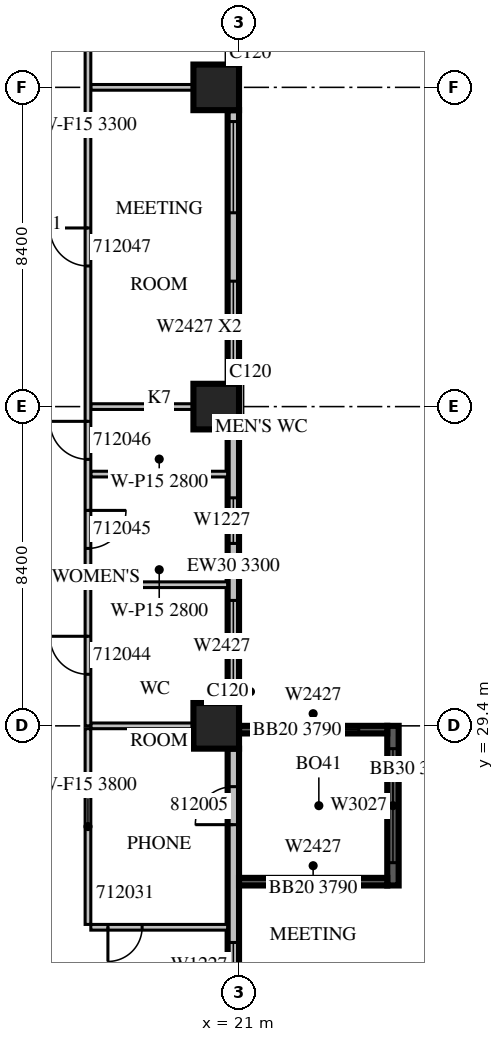
"""IFC4 building model, lengths in metres.
Left out: names, types, materials, properties, quantities, classifications, styles, units other than length and angle.
Written with IfcOpenShell. Run it as: python <this file> out.ifc"""

import sys

from ifc_helpers import new_model, si_unit, direction, frame, frame_2d, origin, origin_2d, place, context, subcontext, project, spatial, rectangle, extrude, source, transform, mapped, element, fill, save


model = new_model("IFC4")
c1 = context("Model", 3, precision=1e-05, world=origin(), true_north=direction((0.0, 1.0)))
c2 = subcontext(c1, "Body", "Model", "MODEL_VIEW")
j1 = project(units=[si_unit("LENGTHUNIT", "METRE"), si_unit("PLANEANGLEUNIT", "RADIAN")], contexts=[c1])
p1 = place(None, origin())
s1 = spatial("IfcSite", under=j1, at=p1, CompositionType="ELEMENT")
p2 = place(p1, origin())
s2 = spatial("IfcBuilding", under=s1, at=p2, CompositionType="ELEMENT")
p3 = place(p2, frame((0.0, 0.0, 61.5)))
s3 = spatial("IfcBuildingStorey", under=s2, at=p3, CompositionType="ELEMENT", Elevation=61.5)
m1 = source(origin(), c2, "Body", "SweptSolid", [
    extrude(rectangle(XDim=1.2, YDim=1.2, at=origin_2d()), origin(), (0.0, 0.0, 1.0), 4.2),
])
for number, where, z_axis, x_axis in (
    (1, (20.4, 29.4, 0.0), (0.0, 0.0, 1.0), (1.0, 0.0, 0.0)),
    (2, (20.4, 37.8, 0.0), (0.0, 0.0, 1.0), (1.0, 0.0, 0.0)),
    (3, (20.4, 46.2, 0.0), (0.0, 0.0, 1.0), (1.0, 0.0, 0.0)),
):
    element("IfcColumn", number, at=place(p3, frame(where, z_axis=z_axis, x_axis=x_axis)), inside=s3, PredefinedType="COLUMN", context=c2, shape_type="MappedRepresentation", body=[
        mapped(m1, transform((0.0, 0.0, 0.0), scale=1.0)),
    ])
m2 = source(origin(), c2, "Body", "SweptSolid", [
    extrude(rectangle(XDim=6.6, YDim=0.3, at=frame_2d((3.3, 0.0))), origin(), (0.0, 0.0, 1.0), 3.8),
])
p4 = place(p3, frame((20.85, 22.2, 0.0), z_axis=(0.0, 0.0, 1.0), x_axis=(0.0, 1.0, 0.0)))
e4 = element("IfcWall", 4, at=p4, inside=s3, PredefinedType="STANDARD", context=c2, shape_type="MappedRepresentation", body=[
    mapped(m2, transform((0.0, 0.0, 0.0), scale=1.0)),
])
m3 = source(origin(), c2, "Body", "SweptSolid", [
    extrude(rectangle(XDim=1.2, YDim=2.7, at=frame_2d((0.6, 1.35))), frame((0.0, 0.16, 0.0), z_axis=(0.0, -1.0, 0.0), x_axis=(1.0, 0.0, 0.0)), (0.0, 0.0, 1.0), 0.32),
])
p5 = place(p4, frame((0.3, 0.0, 0.6)))
e5 = element("IfcOpeningElement", 5, at=p5, cuts=e4, PredefinedType="OPENING", context=c2, shape_type="MappedRepresentation", body=[
    mapped(m3, transform((0.0, 0.0, 0.0), scale=1.0)),
])
m4 = source(origin(), c2, "Body", "SweptSolid", [
    extrude(rectangle(XDim=1.0, YDim=2.1, at=frame_2d((0.5, 1.05))), frame((0.0, 0.16, 0.0), z_axis=(0.0, -1.0, 0.0), x_axis=(1.0, 0.0, 0.0)), (0.0, 0.0, 1.0), 0.32),
])
p6 = place(p4, frame((4.6, 0.0, 0.0)))
e6 = element("IfcOpeningElement", 6, at=p6, cuts=e4, PredefinedType="OPENING", context=c2, shape_type="MappedRepresentation", body=[
    mapped(m4, transform((0.0, 0.0, 0.0), scale=1.0)),
])
m5 = source(origin(), c2, "Body", "SweptSolid", [
    extrude(rectangle(XDim=7.2, YDim=0.3, at=frame_2d((3.6, 0.0))), origin(), (0.0, 0.0, 1.0), 3.3),
])
p7 = place(p3, frame((20.85, 30.0, 0.0), z_axis=(0.0, 0.0, 1.0), x_axis=(0.0, 1.0, 0.0)))
e7 = element("IfcWall", 7, at=p7, inside=s3, PredefinedType="STANDARD", context=c2, shape_type="MappedRepresentation", body=[
    mapped(m5, transform((0.0, 0.0, 0.0), scale=1.0)),
])
m6 = source(origin(), c2, "Body", "SweptSolid", [
    extrude(rectangle(XDim=2.4, YDim=2.7, at=frame_2d((1.2, 1.35))), frame((0.0, 0.16, 0.0), z_axis=(0.0, -1.0, 0.0), x_axis=(1.0, 0.0, 0.0)), (0.0, 0.0, 1.0), 0.32),
])
p8 = place(p7, frame((0.3, 0.0, 0.6)))
e8 = element("IfcOpeningElement", 8, at=p8, cuts=e7, PredefinedType="OPENING", context=c2, shape_type="MappedRepresentation", body=[
    mapped(m6, transform((0.0, 0.0, 0.0), scale=1.0)),
])
p9 = place(p7, frame((4.199, 0.0, 0.6)))
e9 = element("IfcOpeningElement", 9, at=p9, cuts=e7, PredefinedType="OPENING", context=c2, shape_type="MappedRepresentation", body=[
    mapped(m3, transform((0.0, 0.0, 0.0), scale=1.0)),
])
m7 = source(origin(), c2, "Body", "SweptSolid", [
    extrude(rectangle(XDim=7.2, YDim=0.3, at=frame_2d((3.6, 0.0))), origin(), (0.0, 0.0, 1.0), 3.8),
])
p10 = place(p3, frame((20.85, 38.4, 0.0), z_axis=(0.0, 0.0, 1.0), x_axis=(0.0, 1.0, 0.0)))
e10 = element("IfcWall", 10, at=p10, inside=s3, PredefinedType="STANDARD", context=c2, shape_type="MappedRepresentation", body=[
    mapped(m7, transform((0.0, 0.0, 0.0), scale=1.0)),
])
p11 = place(p10, frame((0.3, 0.0, 0.6)))
e11 = element("IfcOpeningElement", 11, at=p11, cuts=e10, PredefinedType="OPENING", context=c2, shape_type="MappedRepresentation", body=[
    mapped(m6, transform((0.0, 0.0, 0.0), scale=1.0)),
])
p12 = place(p10, frame((4.5, 0.0, 0.6)))
e12 = element("IfcOpeningElement", 12, at=p12, cuts=e10, PredefinedType="OPENING", context=c2, shape_type="MappedRepresentation", body=[
    mapped(m6, transform((0.0, 0.0, 0.0), scale=1.0)),
])
m8 = source(origin(), c2, "Body", "SweptSolid", [
    extrude(rectangle(XDim=4.68, YDim=0.3, at=frame_2d((2.34, 0.0))), origin(), (0.0, 0.0, 1.0), 3.8),
])
p13 = place(p3, frame((20.85, 46.8, 0.0), z_axis=(0.0, 0.0, 1.0), x_axis=(0.0, 1.0, 0.0)))
e13 = element("IfcWall", 13, at=p13, inside=s3, PredefinedType="STANDARD", context=c2, shape_type="MappedRepresentation", body=[
    mapped(m8, transform((0.0, 0.0, 0.0), scale=1.0)),
])
m9 = source(origin(), c2, "Body", "SweptSolid", [
    extrude(rectangle(XDim=3.6, YDim=2.7, at=frame_2d((1.8, 1.35))), frame((0.0, 0.16, 0.0), z_axis=(0.0, -1.0, 0.0), x_axis=(1.0, 0.0, 0.0)), (0.0, 0.0, 1.0), 0.32),
])
p14 = place(p13, frame((0.54, 0.0, 0.6)))
e14 = element("IfcOpeningElement", 14, at=p14, cuts=e13, PredefinedType="OPENING", context=c2, shape_type="MappedRepresentation", body=[
    mapped(m9, transform((0.0, 0.0, 0.0), scale=1.0)),
])
m10 = source(origin(), c2, "Body", "SweptSolid", [
    extrude(rectangle(XDim=4.2, YDim=0.3, at=frame_2d((2.1, 0.0))), origin(), (0.0, 0.0, 1.0), 3.79),
])
p15 = place(p3, frame((25.05, 25.2, 0.0), z_axis=(0.0, 0.0, 1.0), x_axis=(0.0, 1.0, 0.0)))
e15 = element("IfcWall", 15, at=p15, inside=s3, PredefinedType="SOLIDWALL", context=c2, shape_type="MappedRepresentation", body=[
    mapped(m10, transform((0.0, 0.0, 0.0), scale=1.0)),
])
m11 = source(origin(), c2, "Body", "SweptSolid", [
    extrude(rectangle(XDim=3.0, YDim=2.7, at=frame_2d((1.5, 1.35))), frame((0.0, 0.16, 0.0), z_axis=(0.0, -1.0, 0.0), x_axis=(1.0, 0.0, 0.0)), (0.0, 0.0, 1.0), 0.32),
])
p16 = place(p15, frame((0.6, 0.0, 0.6)))
e16 = element("IfcOpeningElement", 16, at=p16, cuts=e15, PredefinedType="OPENING", context=c2, shape_type="MappedRepresentation", body=[
    mapped(m11, transform((0.0, 0.0, 0.0), scale=1.0)),
])
m12 = source(origin(), c2, "Body", "SweptSolid", [
    extrude(rectangle(XDim=3.9, YDim=0.2, at=frame_2d((1.95, 0.0))), origin(), (0.0, 0.0, 1.0), 3.79),
])
p17 = place(p3, frame((21.0, 25.3, 0.0), z_axis=(0.0, 0.0, 1.0), x_axis=(1.0, 0.0, 0.0)))
e17 = element("IfcWall", 17, at=p17, inside=s3, PredefinedType="SOLIDWALL", context=c2, shape_type="MappedRepresentation", body=[
    mapped(m12, transform((0.0, 0.0, 0.0), scale=1.0)),
])
m13 = source(origin(), c2, "Body", "SweptSolid", [
    extrude(rectangle(XDim=2.4, YDim=2.7, at=frame_2d((1.2, 1.35))), frame((0.0, 0.11, 0.0), z_axis=(0.0, -1.0, 0.0), x_axis=(1.0, 0.0, 0.0)), (0.0, 0.0, 1.0), 0.22),
])
p18 = place(p17, frame((0.75, 0.0, 0.6)))
e18 = element("IfcOpeningElement", 18, at=p18, cuts=e17, PredefinedType="OPENING", context=c2, shape_type="MappedRepresentation", body=[
    mapped(m13, transform((0.0, 0.0, 0.0), scale=1.0)),
])
p19 = place(p3, frame((21.0, 29.3, 0.0), z_axis=(0.0, 0.0, 1.0), x_axis=(1.0, 0.0, 0.0)))
e19 = element("IfcWall", 19, at=p19, inside=s3, PredefinedType="SOLIDWALL", context=c2, shape_type="MappedRepresentation", body=[
    mapped(m12, transform((0.0, 0.0, 0.0), scale=1.0)),
])
p20 = place(p19, frame((0.75, 0.0, 0.6)))
e20 = element("IfcOpeningElement", 20, at=p20, cuts=e19, PredefinedType="OPENING", context=c2, shape_type="MappedRepresentation", body=[
    mapped(m13, transform((0.0, 0.0, 0.0), scale=1.0)),
])
m14 = source(origin(), c2, "Body", "SweptSolid", [
    extrude(rectangle(XDim=3.6, YDim=0.15, at=frame_2d((1.8, 0.0))), origin(), (0.0, 0.0, 1.0), 3.8),
])
p21 = place(p3, frame((17.1, 24.1, 0.0), z_axis=(0.0, 0.0, 1.0), x_axis=(1.0, 0.0, 0.0)))
e21 = element("IfcWall", 21, at=p21, inside=s3, PredefinedType="PARTITIONING", context=c2, shape_type="MappedRepresentation", body=[
    mapped(m14, transform((0.0, 0.0, 0.0), scale=1.0)),
])
m15 = source(origin(), c2, "Body", "SweptSolid", [
    extrude(rectangle(XDim=0.9, YDim=2.1, at=frame_2d((0.45, 1.05))), frame((0.0, 0.085, 0.0), z_axis=(0.0, -1.0, 0.0), x_axis=(1.0, 0.0, 0.0)), (0.0, 0.0, 1.0), 0.17),
])
p22 = place(p21, frame((0.45, 0.0, 0.0)))
e22 = element("IfcOpeningElement", 22, at=p22, cuts=e21, PredefinedType="OPENING", context=c2, shape_type="MappedRepresentation", body=[
    mapped(m15, transform((0.0, 0.0, 0.0), scale=1.0)),
])
m16 = source(origin(), c2, "Body", "SweptSolid", [
    extrude(rectangle(XDim=5.15, YDim=0.15, at=frame_2d((2.575, 0.0))), origin(), (0.0, 0.0, 1.0), 3.8),
])
p23 = place(p3, frame((17.025, 29.325, 0.0), z_axis=(0.0, 0.0, 1.0), x_axis=(0.0, -1.0, 0.0)))
e23 = element("IfcWall", 23, at=p23, inside=s3, PredefinedType="PARTITIONING", context=c2, shape_type="MappedRepresentation", body=[
    mapped(m16, transform((0.0, 0.0, 0.0), scale=1.0)),
])
m17 = source(origin(), c2, "Body", "SweptSolid", [
    extrude(rectangle(XDim=2.701, YDim=0.15, at=frame_2d((1.351, 0.0))), origin(), (0.0, 0.0, 1.0), 3.8),
])
p24 = place(p3, frame((19.801, 29.4, 0.0), z_axis=(0.0, 0.0, 1.0), x_axis=(-1.0, 0.0, 0.0)))
e24 = element("IfcWall", 24, at=p24, inside=s3, PredefinedType="PARTITIONING", context=c2, shape_type="MappedRepresentation", body=[
    mapped(m17, transform((0.0, 0.0, 0.0), scale=1.0)),
])
m18 = source(origin(), c2, "Body", "SweptSolid", [
    extrude(rectangle(XDim=3.6, YDim=0.15, at=frame_2d((1.8, 0.0))), origin(), (0.0, 0.0, 1.0), 2.8),
])
for number, where, z_axis, x_axis in (
    (25, (17.1, 33.113, 0.0), (0.0, 0.0, 1.0), (1.0, 0.0, 0.0)),
    (26, (17.1, 36.024, 0.0), (0.0, 0.0, 1.0), (1.0, 0.0, 0.0)),
):
    element("IfcWall", number, at=place(p3, frame(where, z_axis=z_axis, x_axis=x_axis)), inside=s3, PredefinedType="PARTITIONING", context=c2, shape_type="MappedRepresentation", body=[
        mapped(m18, transform((0.0, 0.0, 0.0), scale=1.0)),
    ])
for number, where, z_axis, x_axis in (
    (27, (19.801, 37.8, 0.0), (0.0, 0.0, 1.0), (-1.0, 0.0, 0.0)),
    (28, (19.801, 46.2, 0.0), (0.0, 0.0, 1.0), (-1.0, 0.0, 0.0)),
):
    element("IfcWall", number, at=place(p3, frame(where, z_axis=z_axis, x_axis=x_axis)), inside=s3, PredefinedType="PARTITIONING", context=c2, shape_type="MappedRepresentation", body=[
        mapped(m17, transform((0.0, 0.0, 0.0), scale=1.0)),
    ])
m19 = source(origin(), c2, "Body", "SweptSolid", [
    extrude(rectangle(XDim=31.62, YDim=0.15, at=frame_2d((15.81, 0.0))), origin(), (0.0, 0.0, 1.0), 3.3),
])
p25 = place(p3, frame((17.025, 61.02, 0.0), z_axis=(0.0, 0.0, 1.0), x_axis=(0.0, -1.0, 0.0)))
e29 = element("IfcWall", 29, at=p25, inside=s3, PredefinedType="PARTITIONING", context=c2, shape_type="MappedRepresentation", body=[
    mapped(m19, transform((0.0, 0.0, 0.0), scale=1.0)),
])
m20 = source(origin(), c2, "Body", "SweptSolid", [
    extrude(rectangle(XDim=1.0, YDim=2.1, at=frame_2d((0.5, 1.05))), frame((0.0, 0.085, 0.0), z_axis=(0.0, -1.0, 0.0), x_axis=(1.0, 0.0, 0.0)), (0.0, 0.0, 1.0), 0.17),
])
p26 = place(p25, frame((29.263, 0.0, 0.0)))
e30 = element("IfcOpeningElement", 30, at=p26, cuts=e29, PredefinedType="OPENING", context=c2, shape_type="MappedRepresentation", body=[
    mapped(m20, transform((0.0, 0.0, 0.0), scale=1.0)),
])
p27 = place(p25, frame((25.951, 0.0, 0.0)))
e31 = element("IfcOpeningElement", 31, at=p27, cuts=e29, PredefinedType="OPENING", context=c2, shape_type="MappedRepresentation", body=[
    mapped(m20, transform((0.0, 0.0, 0.0), scale=1.0)),
])
p28 = place(p25, frame((23.608, 0.0, 0.0)))
e32 = element("IfcOpeningElement", 32, at=p28, cuts=e29, PredefinedType="OPENING", context=c2, shape_type="MappedRepresentation", body=[
    mapped(m20, transform((0.0, 0.0, 0.0), scale=1.0)),
])
p29 = place(p25, frame((18.52, 0.0, 0.0)))
e33 = element("IfcOpeningElement", 33, at=p29, cuts=e29, PredefinedType="OPENING", context=c2, shape_type="MappedRepresentation", body=[
    mapped(m20, transform((0.0, 0.0, 0.0), scale=1.0)),
])
m21 = source(origin(), c2, "Body", "SweptSolid", [
    extrude(rectangle(XDim=1.2, YDim=2.1, at=frame_2d((0.6, 1.05))), frame((0.0, 0.085, 0.0), z_axis=(0.0, -1.0, 0.0), x_axis=(1.0, 0.0, 0.0)), (0.0, 0.0, 1.0), 0.17),
])
p30 = place(p25, frame((10.496, 0.0, 0.0)))
e34 = element("IfcOpeningElement", 34, at=p30, cuts=e29, PredefinedType="OPENING", context=c2, shape_type="MappedRepresentation", body=[
    mapped(m21, transform((0.0, 0.0, 0.0), scale=1.0)),
])
p31 = place(p25, frame((3.049, 0.0, 0.0)))
e35 = element("IfcOpeningElement", 35, at=p31, cuts=e29, PredefinedType="OPENING", context=c2, shape_type="MappedRepresentation", body=[
    mapped(m21, transform((0.0, 0.0, 0.0), scale=1.0)),
])
m22 = source(origin(), c2, "Body", "SweptSolid", [
    extrude(rectangle(XDim=1.2, YDim=2.7, at=frame_2d((0.6, 1.35))), frame((0.0, 0.03, 0.0), z_axis=(0.0, -1.0, 0.0), x_axis=(1.0, 0.0, 0.0)), (0.0, 0.0, 1.0), 0.06),
])
p32 = place(p5, origin())
e36 = element("IfcWindow", 36, at=p32, inside=s3, PartitioningType="SINGLE_PANEL", PredefinedType="WINDOW", context=c2, shape_type="MappedRepresentation", body=[
    mapped(m22, transform((0.0, 0.0, 0.0), scale=1.0)),
])
fill(e5, e36)
m23 = source(origin(), c2, "Body", "SweptSolid", [
    extrude(rectangle(XDim=2.4, YDim=2.7, at=frame_2d((1.2, 1.35))), frame((0.0, 0.03, 0.0), z_axis=(0.0, -1.0, 0.0), x_axis=(1.0, 0.0, 0.0)), (0.0, 0.0, 1.0), 0.06),
])
p33 = place(p8, origin())
e37 = element("IfcWindow", 37, at=p33, inside=s3, PartitioningType="SINGLE_PANEL", PredefinedType="WINDOW", context=c2, shape_type="MappedRepresentation", body=[
    mapped(m23, transform((0.0, 0.0, 0.0), scale=1.0)),
])
fill(e8, e37)
p34 = place(p9, origin())
e38 = element("IfcWindow", 38, at=p34, inside=s3, PartitioningType="SINGLE_PANEL", PredefinedType="WINDOW", context=c2, shape_type="MappedRepresentation", body=[
    mapped(m22, transform((0.0, 0.0, 0.0), scale=1.0)),
])
fill(e9, e38)
p35 = place(p11, origin())
e39 = element("IfcWindow", 39, at=p35, inside=s3, PartitioningType="SINGLE_PANEL", PredefinedType="WINDOW", context=c2, shape_type="MappedRepresentation", body=[
    mapped(m23, transform((0.0, 0.0, 0.0), scale=1.0)),
])
fill(e11, e39)
p36 = place(p12, origin())
e40 = element("IfcWindow", 40, at=p36, inside=s3, PartitioningType="SINGLE_PANEL", PredefinedType="WINDOW", context=c2, shape_type="MappedRepresentation", body=[
    mapped(m23, transform((0.0, 0.0, 0.0), scale=1.0)),
])
fill(e12, e40)
m24 = source(origin(), c2, "Body", "SweptSolid", [
    extrude(rectangle(XDim=3.0, YDim=2.7, at=frame_2d((1.5, 1.35))), frame((0.0, 0.03, 0.0), z_axis=(0.0, -1.0, 0.0), x_axis=(1.0, 0.0, 0.0)), (0.0, 0.0, 1.0), 0.06),
])
p37 = place(p16, origin())
e41 = element("IfcWindow", 41, at=p37, inside=s3, PartitioningType="SINGLE_PANEL", PredefinedType="WINDOW", context=c2, shape_type="MappedRepresentation", body=[
    mapped(m24, transform((0.0, 0.0, 0.0), scale=1.0)),
])
fill(e16, e41)
p38 = place(p18, origin())
e42 = element("IfcWindow", 42, at=p38, inside=s3, PartitioningType="SINGLE_PANEL", PredefinedType="WINDOW", context=c2, shape_type="MappedRepresentation", body=[
    mapped(m23, transform((0.0, 0.0, 0.0), scale=1.0)),
])
fill(e18, e42)
p39 = place(p20, origin())
e43 = element("IfcWindow", 43, at=p39, inside=s3, PartitioningType="SINGLE_PANEL", PredefinedType="WINDOW", context=c2, shape_type="MappedRepresentation", body=[
    mapped(m23, transform((0.0, 0.0, 0.0), scale=1.0)),
])
fill(e20, e43)
m25 = source(origin(), c2, "Body", "SweptSolid", [
    extrude(rectangle(XDim=0.9, YDim=2.1, at=frame_2d((0.45, 1.05))), frame((0.0, 0.025, 0.0), z_axis=(0.0, -1.0, 0.0), x_axis=(1.0, 0.0, 0.0)), (0.0, 0.0, 1.0), 0.05),
])
p40 = place(p22, origin())
e44 = element("IfcDoor", 44, at=p40, inside=s3, OperationType="SINGLE_SWING_RIGHT", PredefinedType="DOOR", context=c2, shape_type="MappedRepresentation", body=[
    mapped(m25, transform((0.0, 0.0, 0.0), scale=1.0)),
])
fill(e22, e44)
m26 = source(origin(), c2, "Body", "SweptSolid", [
    extrude(rectangle(XDim=1.0, YDim=2.1, at=frame_2d((0.5, 1.05))), frame((0.0, 0.025, 0.0), z_axis=(0.0, -1.0, 0.0), x_axis=(1.0, 0.0, 0.0)), (0.0, 0.0, 1.0), 0.05),
])
p41 = place(p26, origin())
e45 = element("IfcDoor", 45, at=p41, inside=s3, OperationType="SINGLE_SWING_RIGHT", PredefinedType="DOOR", context=c2, shape_type="MappedRepresentation", body=[
    mapped(m26, transform((0.0, 0.0, 0.0), scale=1.0)),
])
fill(e30, e45)
p42 = place(p27, origin())
e46 = element("IfcDoor", 46, at=p42, inside=s3, OperationType="SINGLE_SWING_LEFT", PredefinedType="DOOR", context=c2, shape_type="MappedRepresentation", body=[
    mapped(m26, transform((0.0, 0.0, 0.0), scale=1.0)),
])
fill(e31, e46)
p43 = place(p28, origin())
e47 = element("IfcDoor", 47, at=p43, inside=s3, OperationType="SINGLE_SWING_RIGHT", PredefinedType="DOOR", context=c2, shape_type="MappedRepresentation", body=[
    mapped(m26, transform((0.0, 0.0, 0.0), scale=1.0)),
])
fill(e32, e47)
p44 = place(p29, origin())
e48 = element("IfcDoor", 48, at=p44, inside=s3, OperationType="SINGLE_SWING_RIGHT", PredefinedType="DOOR", context=c2, shape_type="MappedRepresentation", body=[
    mapped(m26, transform((0.0, 0.0, 0.0), scale=1.0)),
])
fill(e33, e48)
p45 = place(p6, origin())
e49 = element("IfcDoor", 49, at=p45, inside=s3, OperationType="SINGLE_SWING_LEFT", PredefinedType="DOOR", context=c2, shape_type="MappedRepresentation", body=[
    mapped(m26, transform((0.0, 0.0, 0.0), scale=1.0)),
])
fill(e6, e49)
save(model, sys.argv[1])
